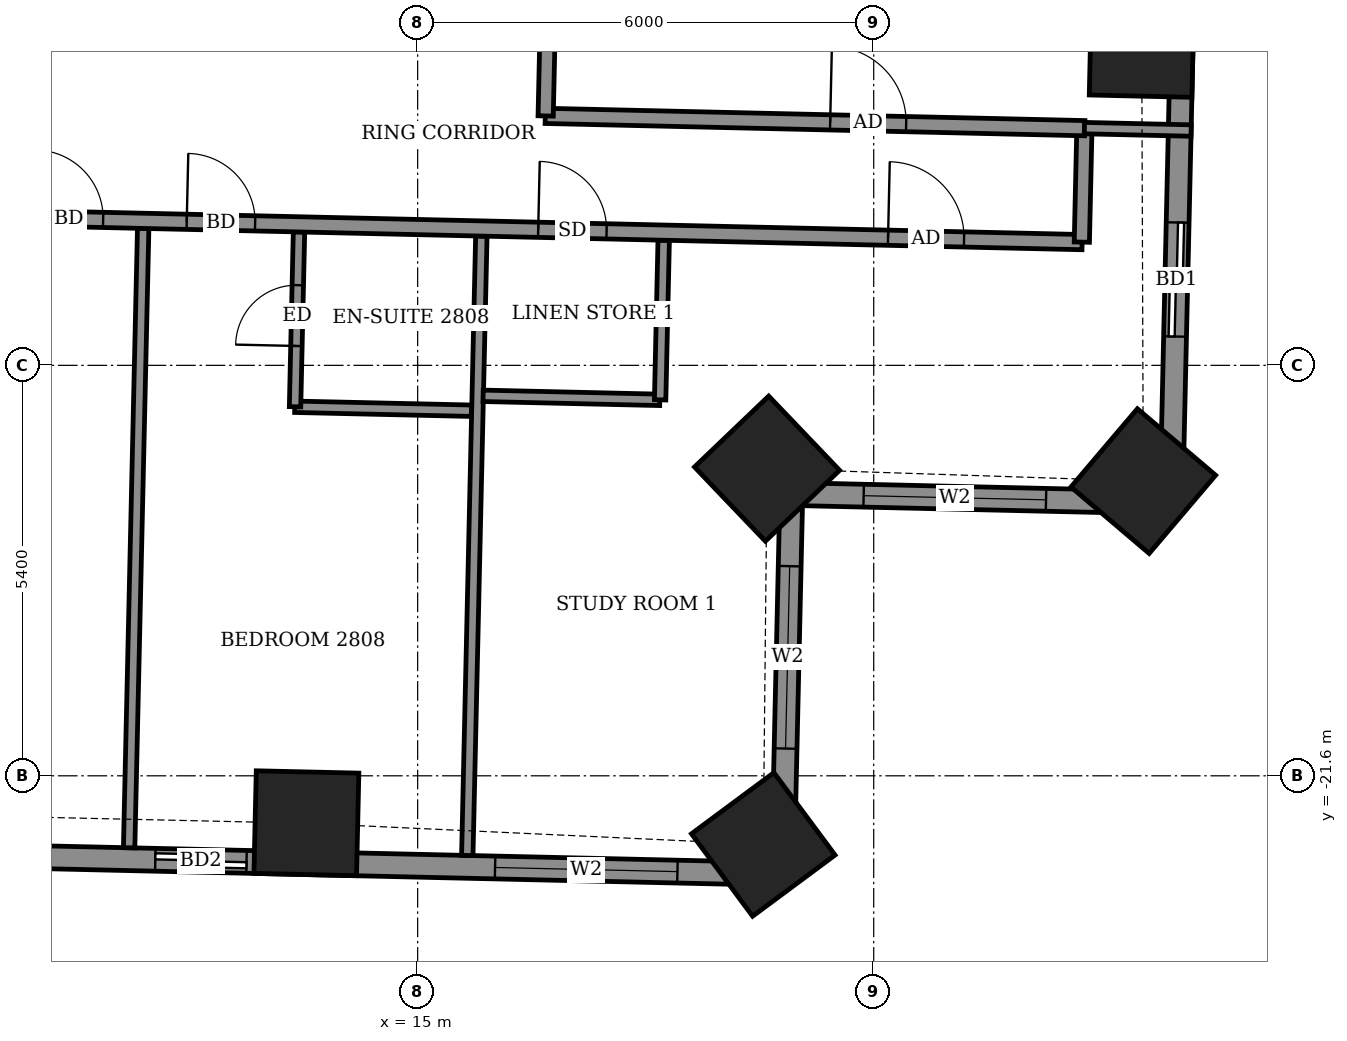
"""IFC4 building model, lengths in metres.
Left out: names, types, materials, properties, quantities, classifications, styles, units other than length and angle.
Written with IfcOpenShell. Run it as: python <this file> out.ifc"""

import sys

from ifc_helpers import new_model, si_unit, direction, frame, frame_2d, origin, origin_2d, place, context, subcontext, project, spatial, rectangle, extrude, element, fill, save


model = new_model("IFC4")
c1 = context("Model", 3, precision=1e-05, world=origin(), true_north=direction((0.0, 1.0)))
c2 = subcontext(c1, "Body", "Model", "MODEL_VIEW")
j1 = project(units=[si_unit("LENGTHUNIT", "METRE"), si_unit("PLANEANGLEUNIT", "RADIAN")], contexts=[c1])
p1 = place(None, origin())
s1 = spatial("IfcSite", under=j1, at=p1, CompositionType="ELEMENT")
p2 = place(p1, origin())
s2 = spatial("IfcBuilding", under=s1, at=p2, CompositionType="ELEMENT")
p3 = place(p2, frame((0.0, 0.0, 112.7)))
s3 = spatial("IfcBuildingStorey", under=s2, at=p3, CompositionType="ELEMENT", Elevation=112.7)
for number, where, z_axis, x_axis in (
    (1, (13.536, -22.224, -0.55), (0.0, 0.0, 1.0), (1.0, -0.023, 0.0)),
    (2, (19.547, -22.503, -0.55), (0.0, 0.0, 1.0), (0.803, 0.596, 0.0)),
    (3, (19.597, -17.559, -0.55), (0.0, 0.0, 1.0), (0.723, 0.691, 0.0)),
    (4, (24.547, -17.723, -0.55), (0.0, 0.0, 1.0), (0.647, 0.762, 0.0)),
    (5, (24.526, -11.984, -0.55), (0.0, 0.0, 1.0), (0.023, 1.0, 0.0)),
):
    element("IfcColumn", number, at=place(p3, frame(where, z_axis=z_axis, x_axis=x_axis)), inside=s3, PredefinedType="COLUMN", context=c2, shape_type="SweptSolid", body=[
        extrude(rectangle(XDim=1.35, YDim=1.35, at=origin_2d()), origin(), (0.0, 0.0, 1.0), 3.6),
    ])
p4 = place(p3, frame((24.915, -18.007, 0.0), z_axis=(0.0, 0.0, 1.0), x_axis=(0.02263706344, 0.999743748847, 0.0)))
e6 = element("IfcWall", 6, at=p4, inside=s3, PredefinedType="SOLIDWALL", context=c2, shape_type="SweptSolid", body=[
    extrude(rectangle(XDim=12.23, YDim=0.3, at=frame_2d((6.115, 0.0))), origin(), (0.0, 0.0, 1.0), 3.05),
])
p5 = place(p4, frame((2.187, 0.0, 0.0)))
e7 = element("IfcOpeningElement", 7, at=p5, cuts=e6, PredefinedType="OPENING", context=c2, shape_type="SweptSolid", body=[
    extrude(rectangle(XDim=1.5, YDim=2.4, at=frame_2d((0.75, 1.2))), frame((0.0, 0.16, 0.0), z_axis=(0.0, -1.0, 0.0), x_axis=(1.0, 0.0, 0.0)), (0.0, 0.0, 1.0), 0.32),
])
p6 = place(p4, frame((7.014, 0.0, 0.9)))
e8 = element("IfcOpeningElement", 8, at=p6, cuts=e6, PredefinedType="OPENING", context=c2, shape_type="SweptSolid", body=[
    extrude(rectangle(XDim=2.4, YDim=1.5, at=frame_2d((1.2, 0.75))), frame((0.0, 0.16, 0.0), z_axis=(0.0, -1.0, 0.0), x_axis=(1.0, 0.0, 0.0)), (0.0, 0.0, 1.0), 0.32),
])
p7 = place(p3, frame((-24.894, -21.878, 0.0), z_axis=(0.0, 0.0, 1.0), x_axis=(0.999742689045, -0.022683820265, 0.0)))
e9 = element("IfcWall", 9, at=p7, inside=s3, PredefinedType="SOLIDWALL", context=c2, shape_type="SweptSolid", body=[
    extrude(rectangle(XDim=44.708, YDim=0.3, at=frame_2d((22.354, 0.0))), origin(), (0.0, 0.0, 1.0), 3.05),
])
p8 = place(p7, frame((1.902, 0.0, 0.0)))
e10 = element("IfcOpeningElement", 10, at=p8, cuts=e9, PredefinedType="OPENING", context=c2, shape_type="SweptSolid", body=[
    extrude(rectangle(XDim=1.5, YDim=2.4, at=frame_2d((0.75, 1.2))), frame((0.0, 0.16, 0.0), z_axis=(0.0, -1.0, 0.0), x_axis=(1.0, 0.0, 0.0)), (0.0, 0.0, 1.0), 0.32),
])
p9 = place(p7, frame((7.178, 0.0, 0.0)))
e11 = element("IfcOpeningElement", 11, at=p9, cuts=e9, PredefinedType="OPENING", context=c2, shape_type="SweptSolid", body=[
    extrude(rectangle(XDim=1.2, YDim=2.4, at=frame_2d((0.6, 1.2))), frame((0.0, 0.16, 0.0), z_axis=(0.0, -1.0, 0.0), x_axis=(1.0, 0.0, 0.0)), (0.0, 0.0, 1.0), 0.32),
])
p10 = place(p7, frame((9.817, 0.0, 0.0)))
e12 = element("IfcOpeningElement", 12, at=p10, cuts=e9, PredefinedType="OPENING", context=c2, shape_type="SweptSolid", body=[
    extrude(rectangle(XDim=1.5, YDim=2.4, at=frame_2d((0.75, 1.2))), frame((0.0, 0.16, 0.0), z_axis=(0.0, -1.0, 0.0), x_axis=(1.0, 0.0, 0.0)), (0.0, 0.0, 1.0), 0.32),
])
p11 = place(p7, frame((14.9, 0.0, 0.0)))
e13 = element("IfcOpeningElement", 13, at=p11, cuts=e9, PredefinedType="OPENING", context=c2, shape_type="SweptSolid", body=[
    extrude(rectangle(XDim=1.5, YDim=2.4, at=frame_2d((0.75, 1.2))), frame((0.0, 0.16, 0.0), z_axis=(0.0, -1.0, 0.0), x_axis=(1.0, 0.0, 0.0)), (0.0, 0.0, 1.0), 0.32),
])
p12 = place(p7, frame((20.207, 0.0, 0.0)))
e14 = element("IfcOpeningElement", 14, at=p12, cuts=e9, PredefinedType="OPENING", context=c2, shape_type="SweptSolid", body=[
    extrude(rectangle(XDim=1.5, YDim=2.4, at=frame_2d((0.75, 1.2))), frame((0.0, 0.16, 0.0), z_axis=(0.0, -1.0, 0.0), x_axis=(1.0, 0.0, 0.0)), (0.0, 0.0, 1.0), 0.32),
])
p13 = place(p7, frame((22.997, 0.0, 0.0)))
e15 = element("IfcOpeningElement", 15, at=p13, cuts=e9, PredefinedType="OPENING", context=c2, shape_type="SweptSolid", body=[
    extrude(rectangle(XDim=1.5, YDim=2.4, at=frame_2d((0.75, 1.2))), frame((0.0, 0.16, 0.0), z_axis=(0.0, -1.0, 0.0), x_axis=(1.0, 0.0, 0.0)), (0.0, 0.0, 1.0), 0.32),
])
p14 = place(p7, frame((28.562, 0.0, 0.0)))
e16 = element("IfcOpeningElement", 16, at=p14, cuts=e9, PredefinedType="OPENING", context=c2, shape_type="SweptSolid", body=[
    extrude(rectangle(XDim=1.5, YDim=2.4, at=frame_2d((0.75, 1.2))), frame((0.0, 0.16, 0.0), z_axis=(0.0, -1.0, 0.0), x_axis=(1.0, 0.0, 0.0)), (0.0, 0.0, 1.0), 0.32),
])
p15 = place(p7, frame((33.512, 0.0, 0.0)))
e17 = element("IfcOpeningElement", 17, at=p15, cuts=e9, PredefinedType="OPENING", context=c2, shape_type="SweptSolid", body=[
    extrude(rectangle(XDim=1.5, YDim=2.4, at=frame_2d((0.75, 1.2))), frame((0.0, 0.16, 0.0), z_axis=(0.0, -1.0, 0.0), x_axis=(1.0, 0.0, 0.0)), (0.0, 0.0, 1.0), 0.32),
])
p16 = place(p7, frame((36.452, 0.0, 0.0)))
e18 = element("IfcOpeningElement", 18, at=p16, cuts=e9, PredefinedType="OPENING", context=c2, shape_type="SweptSolid", body=[
    extrude(rectangle(XDim=1.2, YDim=2.4, at=frame_2d((0.6, 1.2))), frame((0.0, 0.16, 0.0), z_axis=(0.0, -1.0, 0.0), x_axis=(1.0, 0.0, 0.0)), (0.0, 0.0, 1.0), 0.32),
])
p17 = place(p7, frame((40.923, 0.0, 0.9)))
e19 = element("IfcOpeningElement", 19, at=p17, cuts=e9, PredefinedType="OPENING", context=c2, shape_type="SweptSolid", body=[
    extrude(rectangle(XDim=2.4, YDim=1.5, at=frame_2d((1.2, 0.75))), frame((0.0, 0.16, 0.0), z_axis=(0.0, -1.0, 0.0), x_axis=(1.0, 0.0, 0.0)), (0.0, 0.0, 1.0), 0.32),
])
p18 = place(p3, frame((19.803, -22.892, 0.0), z_axis=(0.0, 0.0, 1.0), x_axis=(0.022606059803, 0.999744450377, 0.0)))
e20 = element("IfcWall", 20, at=p18, inside=s3, PredefinedType="SOLIDWALL", context=c2, shape_type="SweptSolid", body=[
    extrude(rectangle(XDim=5.0, YDim=0.3, at=frame_2d((2.5, 0.0))), origin(), (0.0, 0.0, 1.0), 2.55),
])
p19 = place(p18, frame((1.651, 0.0, 0.9)))
e21 = element("IfcOpeningElement", 21, at=p19, cuts=e20, PredefinedType="OPENING", context=c2, shape_type="SweptSolid", body=[
    extrude(rectangle(XDim=2.4, YDim=1.5, at=frame_2d((1.2, 0.75))), frame((0.0, 0.16, 0.0), z_axis=(0.0, -1.0, 0.0), x_axis=(1.0, 0.0, 0.0)), (0.0, 0.0, 1.0), 0.32),
])
p20 = place(p3, frame((19.916, -17.893, 0.0), z_axis=(0.0, 0.0, 1.0), x_axis=(0.999740017489, -0.022801259434, 0.0)))
e22 = element("IfcWall", 22, at=p20, inside=s3, PredefinedType="SOLIDWALL", context=c2, shape_type="SweptSolid", body=[
    extrude(rectangle(XDim=5.0, YDim=0.3, at=frame_2d((2.5, 0.0))), origin(), (0.0, 0.0, 1.0), 2.55),
])
p21 = place(p20, frame((0.952, 0.0, 0.9)))
e23 = element("IfcOpeningElement", 23, at=p21, cuts=e22, PredefinedType="OPENING", context=c2, shape_type="SweptSolid", body=[
    extrude(rectangle(XDim=2.4, YDim=1.5, at=frame_2d((1.2, 0.75))), frame((0.0, 0.16, 0.0), z_axis=(0.0, -1.0, 0.0), x_axis=(1.0, 0.0, 0.0)), (0.0, 0.0, 1.0), 0.32),
])
p22 = place(p3, frame((11.204, -22.547, 0.0), z_axis=(0.0, 0.0, 1.0), x_axis=(0.022675815822, 0.999742870631, 0.0)))
e24 = element("IfcWall", 24, at=p22, inside=s3, PredefinedType="PARTITIONING", context=c2, shape_type="SweptSolid", body=[
    extrude(rectangle(XDim=8.15, YDim=0.15, at=frame_2d((4.075, 0.0))), origin(), (0.0, 0.0, 1.0), 2.55),
])
p23 = place(p3, frame((15.653, -22.648, 0.0), z_axis=(0.0, 0.0, 1.0), x_axis=(0.022676494918, 0.999742855227, 0.0)))
e25 = element("IfcWall", 25, at=p23, inside=s3, PredefinedType="PARTITIONING", context=c2, shape_type="SweptSolid", body=[
    extrude(rectangle(XDim=8.15, YDim=0.15, at=frame_2d((4.075, 0.0))), origin(), (0.0, 0.0, 1.0), 2.55),
])
p24 = place(p3, frame((13.383, -16.745, 0.0), z_axis=(0.0, 0.0, 1.0), x_axis=(0.999749744571, -0.022370700241, 0.0)))
e26 = element("IfcWall", 26, at=p24, inside=s3, PredefinedType="PARTITIONING", context=c2, shape_type="SweptSolid", body=[
    extrude(rectangle(XDim=2.324, YDim=0.15, at=frame_2d((1.162, 0.0))), origin(), (0.0, 0.0, 1.0), 3.05),
])
p25 = place(p3, frame((13.387, -16.745, 0.0), z_axis=(0.0, 0.0, 1.0), x_axis=(0.022603288534, 0.999744513037, 0.0)))
e27 = element("IfcWall", 27, at=p25, inside=s3, PredefinedType="PARTITIONING", context=c2, shape_type="SweptSolid", body=[
    extrude(rectangle(XDim=2.301, YDim=0.15, at=frame_2d((1.15, 0.0))), origin(), (0.0, 0.0, 1.0), 3.05),
])
p26 = place(p25, frame((0.8, 0.0, 0.0)))
e28 = element("IfcOpeningElement", 28, at=p26, cuts=e27, PredefinedType="OPENING", context=c2, shape_type="SweptSolid", body=[
    extrude(rectangle(XDim=0.8, YDim=2.1, at=frame_2d((0.4, 1.05))), frame((0.0, 0.085, 0.0), z_axis=(0.0, -1.0, 0.0), x_axis=(1.0, 0.0, 0.0)), (0.0, 0.0, 1.0), 0.17),
])
p27 = place(p3, frame((15.861, -16.601, 0.0), z_axis=(0.0, 0.0, 1.0), x_axis=(0.999740478815, -0.022781023197, 0.0)))
e29 = element("IfcWall", 29, at=p27, inside=s3, PredefinedType="PARTITIONING", context=c2, shape_type="SweptSolid", body=[
    extrude(rectangle(XDim=2.325, YDim=0.15, at=frame_2d((1.163, 0.0))), origin(), (0.0, 0.0, 1.0), 3.05),
])
p28 = place(p3, frame((18.19, -16.654, 0.0), z_axis=(0.0, 0.0, 1.0), x_axis=(0.022430997437, 0.999748393524, 0.0)))
e30 = element("IfcWall", 30, at=p28, inside=s3, PredefinedType="PARTITIONING", context=c2, shape_type="SweptSolid", body=[
    extrude(rectangle(XDim=2.101, YDim=0.15, at=frame_2d((1.05, 0.0))), origin(), (0.0, 0.0, 1.0), 3.05),
])
p29 = place(p3, frame((-26.978, -13.428, 0.0), z_axis=(0.0, 0.0, 1.0), x_axis=(0.999742553034, -0.02268981385, 0.0)))
e31 = element("IfcWall", 31, at=p29, inside=s3, PredefinedType="PARTITIONING", context=c2, shape_type="SweptSolid", body=[
    extrude(rectangle(XDim=50.733, YDim=0.2, at=frame_2d((25.366, 0.0))), origin(), (0.0, 0.0, 1.0), 3.05),
])
p30 = place(p29, frame((2.293, 0.0, 0.0)))
e32 = element("IfcOpeningElement", 32, at=p30, cuts=e31, PredefinedType="OPENING", context=c2, shape_type="SweptSolid", body=[
    extrude(rectangle(XDim=1.0, YDim=2.1, at=frame_2d((0.5, 1.05))), frame((0.0, 0.11, 0.0), z_axis=(0.0, -1.0, 0.0), x_axis=(1.0, 0.0, 0.0)), (0.0, 0.0, 1.0), 0.22),
])
p31 = place(p29, frame((9.65, 0.0, 0.0)))
e33 = element("IfcOpeningElement", 33, at=p31, cuts=e31, PredefinedType="OPENING", context=c2, shape_type="SweptSolid", body=[
    extrude(rectangle(XDim=0.9, YDim=2.1, at=frame_2d((0.45, 1.05))), frame((0.0, 0.11, 0.0), z_axis=(0.0, -1.0, 0.0), x_axis=(1.0, 0.0, 0.0)), (0.0, 0.0, 1.0), 0.22),
])
p32 = place(p29, frame((11.75, 0.0, 0.0)))
e34 = element("IfcOpeningElement", 34, at=p32, cuts=e31, PredefinedType="OPENING", context=c2, shape_type="SweptSolid", body=[
    extrude(rectangle(XDim=0.9, YDim=2.1, at=frame_2d((0.45, 1.05))), frame((0.0, 0.11, 0.0), z_axis=(0.0, -1.0, 0.0), x_axis=(1.0, 0.0, 0.0)), (0.0, 0.0, 1.0), 0.22),
])
p33 = place(p29, frame((18.675, 0.0, 0.0)))
e35 = element("IfcOpeningElement", 35, at=p33, cuts=e31, PredefinedType="OPENING", context=c2, shape_type="SweptSolid", body=[
    extrude(rectangle(XDim=0.9, YDim=2.1, at=frame_2d((0.45, 1.05))), frame((0.0, 0.11, 0.0), z_axis=(0.0, -1.0, 0.0), x_axis=(1.0, 0.0, 0.0)), (0.0, 0.0, 1.0), 0.22),
])
p34 = place(p29, frame((20.75, 0.0, 0.0)))
e36 = element("IfcOpeningElement", 36, at=p34, cuts=e31, PredefinedType="OPENING", context=c2, shape_type="SweptSolid", body=[
    extrude(rectangle(XDim=0.9, YDim=2.1, at=frame_2d((0.45, 1.05))), frame((0.0, 0.11, 0.0), z_axis=(0.0, -1.0, 0.0), x_axis=(1.0, 0.0, 0.0)), (0.0, 0.0, 1.0), 0.22),
])
p35 = place(p29, frame((27.725, 0.0, 0.0)))
e37 = element("IfcOpeningElement", 37, at=p35, cuts=e31, PredefinedType="OPENING", context=c2, shape_type="SweptSolid", body=[
    extrude(rectangle(XDim=0.9, YDim=2.1, at=frame_2d((0.45, 1.05))), frame((0.0, 0.11, 0.0), z_axis=(0.0, -1.0, 0.0), x_axis=(1.0, 0.0, 0.0)), (0.0, 0.0, 1.0), 0.22),
])
p36 = place(p29, frame((30.025, 0.0, 0.0)))
e38 = element("IfcOpeningElement", 38, at=p36, cuts=e31, PredefinedType="OPENING", context=c2, shape_type="SweptSolid", body=[
    extrude(rectangle(XDim=0.9, YDim=2.1, at=frame_2d((0.45, 1.05))), frame((0.0, 0.11, 0.0), z_axis=(0.0, -1.0, 0.0), x_axis=(1.0, 0.0, 0.0)), (0.0, 0.0, 1.0), 0.22),
])
p37 = place(p29, frame((36.95, 0.0, 0.0)))
e39 = element("IfcOpeningElement", 39, at=p37, cuts=e31, PredefinedType="OPENING", context=c2, shape_type="SweptSolid", body=[
    extrude(rectangle(XDim=0.9, YDim=2.1, at=frame_2d((0.45, 1.05))), frame((0.0, 0.11, 0.0), z_axis=(0.0, -1.0, 0.0), x_axis=(1.0, 0.0, 0.0)), (0.0, 0.0, 1.0), 0.22),
])
p38 = place(p29, frame((38.95, 0.0, 0.0)))
e40 = element("IfcOpeningElement", 40, at=p38, cuts=e31, PredefinedType="OPENING", context=c2, shape_type="SweptSolid", body=[
    extrude(rectangle(XDim=0.9, YDim=2.1, at=frame_2d((0.45, 1.05))), frame((0.0, 0.11, 0.0), z_axis=(0.0, -1.0, 0.0), x_axis=(1.0, 0.0, 0.0)), (0.0, 0.0, 1.0), 0.22),
])
p39 = place(p29, frame((48.179, 0.0, 0.0)))
e41 = element("IfcOpeningElement", 41, at=p39, cuts=e31, PredefinedType="OPENING", context=c2, shape_type="SweptSolid", body=[
    extrude(rectangle(XDim=1.0, YDim=2.1, at=frame_2d((0.5, 1.05))), frame((0.0, 0.11, 0.0), z_axis=(0.0, -1.0, 0.0), x_axis=(1.0, 0.0, 0.0)), (0.0, 0.0, 1.0), 0.22),
])
p40 = place(p29, frame((43.575, 0.0, 0.0)))
e42 = element("IfcOpeningElement", 42, at=p40, cuts=e31, PredefinedType="OPENING", context=c2, shape_type="SweptSolid", body=[
    extrude(rectangle(XDim=0.9, YDim=2.1, at=frame_2d((0.45, 1.05))), frame((0.0, 0.11, 0.0), z_axis=(0.0, -1.0, 0.0), x_axis=(1.0, 0.0, 0.0)), (0.0, 0.0, 1.0), 0.22),
])
p41 = place(p3, frame((23.738, -14.579, 0.0), z_axis=(0.0, 0.0, 1.0), x_axis=(0.022617910375, 0.999744182344, 0.0)))
e43 = element("IfcWall", 43, at=p41, inside=s3, PredefinedType="PARTITIONING", context=c2, shape_type="SweptSolid", body=[
    extrude(rectangle(XDim=1.5, YDim=0.2, at=frame_2d((0.75, 0.0))), origin(), (0.0, 0.0, 1.0), 3.05),
])
p42 = place(p3, frame((16.679, -12.918, 0.0), z_axis=(0.0, 0.0, 1.0), x_axis=(0.999739218926, -0.02283624622, 0.0)))
e44 = element("IfcWall", 44, at=p42, inside=s3, PredefinedType="PARTITIONING", context=c2, shape_type="SweptSolid", body=[
    extrude(rectangle(XDim=7.099, YDim=0.2, at=frame_2d((3.549, 0.0))), origin(), (0.0, 0.0, 1.0), 3.05),
])
p43 = place(p42, frame((3.749, 0.0, 0.0)))
e45 = element("IfcOpeningElement", 45, at=p43, cuts=e44, PredefinedType="OPENING", context=c2, shape_type="SweptSolid", body=[
    extrude(rectangle(XDim=1.0, YDim=2.1, at=frame_2d((0.5, 1.05))), frame((0.0, 0.11, 0.0), z_axis=(0.0, -1.0, 0.0), x_axis=(1.0, 0.0, 0.0)), (0.0, 0.0, 1.0), 0.22),
])
p44 = place(p3, frame((16.684, -12.919, 0.0), z_axis=(0.0, 0.0, 1.0), x_axis=(0.022667483124, 0.999743059595, 0.0)))
e46 = element("IfcWall", 46, at=p44, inside=s3, PredefinedType="PARTITIONING", context=c2, shape_type="SweptSolid", body=[
    extrude(rectangle(XDim=5.245, YDim=0.2, at=frame_2d((2.623, 0.0))), origin(), (0.0, 0.0, 1.0), 3.05),
])
p45 = place(p3, frame((23.772, -13.079, 0.0), z_axis=(0.0, 0.0, 1.0), x_axis=(0.999740667531, -0.022772739949, 0.0)))
e47 = element("IfcWall", 47, at=p45, inside=s3, PredefinedType="PARTITIONING", context=c2, shape_type="SweptSolid", body=[
    extrude(rectangle(XDim=1.404, YDim=0.15, at=frame_2d((0.702, 0.0))), origin(), (0.0, 0.0, 1.0), 2.55),
])
p46 = place(p5, origin())
e48 = element("IfcDoor", 48, at=p46, inside=s3, OperationType="SLIDING_TO_LEFT", PredefinedType="DOOR", context=c2, shape_type="SweptSolid", body=[
    extrude(rectangle(XDim=1.5, YDim=2.4, at=frame_2d((0.75, 1.2))), frame((0.0, 0.025, 0.0), z_axis=(0.0, -1.0, 0.0), x_axis=(1.0, 0.0, 0.0)), (0.0, 0.0, 1.0), 0.05),
])
fill(e7, e48)
p47 = place(p16, origin())
e49 = element("IfcDoor", 49, at=p47, inside=s3, OperationType="SLIDING_TO_LEFT", PredefinedType="DOOR", context=c2, shape_type="SweptSolid", body=[
    extrude(rectangle(XDim=1.2, YDim=2.4, at=frame_2d((0.6, 1.2))), frame((0.0, 0.025, 0.0), z_axis=(0.0, -1.0, 0.0), x_axis=(1.0, 0.0, 0.0)), (0.0, 0.0, 1.0), 0.05),
])
fill(e18, e49)
p48 = place(p17, origin())
e50 = element("IfcWindow", 50, at=p48, inside=s3, PartitioningType="DOUBLE_PANEL_VERTICAL", PredefinedType="WINDOW", context=c2, shape_type="SweptSolid", body=[
    extrude(rectangle(XDim=2.4, YDim=1.5, at=frame_2d((1.2, 0.75))), frame((0.0, 0.03, 0.0), z_axis=(0.0, -1.0, 0.0), x_axis=(1.0, 0.0, 0.0)), (0.0, 0.0, 1.0), 0.06),
])
fill(e19, e50)
p49 = place(p19, origin())
e51 = element("IfcWindow", 51, at=p49, inside=s3, PartitioningType="DOUBLE_PANEL_VERTICAL", PredefinedType="WINDOW", context=c2, shape_type="SweptSolid", body=[
    extrude(rectangle(XDim=2.4, YDim=1.5, at=frame_2d((1.2, 0.75))), frame((0.0, 0.03, 0.0), z_axis=(0.0, -1.0, 0.0), x_axis=(1.0, 0.0, 0.0)), (0.0, 0.0, 1.0), 0.06),
])
fill(e21, e51)
p50 = place(p21, origin())
e52 = element("IfcWindow", 52, at=p50, inside=s3, PartitioningType="DOUBLE_PANEL_VERTICAL", PredefinedType="WINDOW", context=c2, shape_type="SweptSolid", body=[
    extrude(rectangle(XDim=2.4, YDim=1.5, at=frame_2d((1.2, 0.75))), frame((0.0, 0.03, 0.0), z_axis=(0.0, -1.0, 0.0), x_axis=(1.0, 0.0, 0.0)), (0.0, 0.0, 1.0), 0.06),
])
fill(e23, e52)
p51 = place(p37, origin())
e53 = element("IfcDoor", 53, at=p51, inside=s3, OperationType="SINGLE_SWING_LEFT", PredefinedType="DOOR", context=c2, shape_type="SweptSolid", body=[
    extrude(rectangle(XDim=0.9, YDim=2.1, at=frame_2d((0.45, 1.05))), frame((0.0, 0.025, 0.0), z_axis=(0.0, -1.0, 0.0), x_axis=(1.0, 0.0, 0.0)), (0.0, 0.0, 1.0), 0.05),
])
fill(e39, e53)
p52 = place(p38, origin())
e54 = element("IfcDoor", 54, at=p52, inside=s3, OperationType="SINGLE_SWING_RIGHT", PredefinedType="DOOR", context=c2, shape_type="SweptSolid", body=[
    extrude(rectangle(XDim=0.9, YDim=2.1, at=frame_2d((0.45, 1.05))), frame((0.0, 0.025, 0.0), z_axis=(0.0, -1.0, 0.0), x_axis=(1.0, 0.0, 0.0)), (0.0, 0.0, 1.0), 0.05),
])
fill(e40, e54)
p53 = place(p26, origin())
e55 = element("IfcDoor", 55, at=p53, inside=s3, OperationType="SINGLE_SWING_RIGHT", PredefinedType="DOOR", context=c2, shape_type="SweptSolid", body=[
    extrude(rectangle(XDim=0.8, YDim=2.1, at=frame_2d((0.4, 1.05))), frame((0.0, 0.025, 0.0), z_axis=(0.0, -1.0, 0.0), x_axis=(1.0, 0.0, 0.0)), (0.0, 0.0, 1.0), 0.05),
])
fill(e28, e55)
p54 = place(p39, origin())
e56 = element("IfcDoor", 56, at=p54, inside=s3, OperationType="SINGLE_SWING_RIGHT", PredefinedType="DOOR", context=c2, shape_type="SweptSolid", body=[
    extrude(rectangle(XDim=1.0, YDim=2.1, at=frame_2d((0.5, 1.05))), frame((0.0, 0.025, 0.0), z_axis=(0.0, -1.0, 0.0), x_axis=(1.0, 0.0, 0.0)), (0.0, 0.0, 1.0), 0.05),
])
fill(e41, e56)
p55 = place(p40, origin())
e57 = element("IfcDoor", 57, at=p55, inside=s3, OperationType="SINGLE_SWING_LEFT", PredefinedType="DOOR", context=c2, shape_type="SweptSolid", body=[
    extrude(rectangle(XDim=0.9, YDim=2.1, at=frame_2d((0.45, 1.05))), frame((0.0, 0.025, 0.0), z_axis=(0.0, -1.0, 0.0), x_axis=(1.0, 0.0, 0.0)), (0.0, 0.0, 1.0), 0.05),
])
fill(e42, e57)
p56 = place(p43, origin())
e58 = element("IfcDoor", 58, at=p56, inside=s3, OperationType="SINGLE_SWING_LEFT", PredefinedType="DOOR", context=c2, shape_type="SweptSolid", body=[
    extrude(rectangle(XDim=1.0, YDim=2.1, at=frame_2d((0.5, 1.05))), frame((0.0, 0.025, 0.0), z_axis=(0.0, -1.0, 0.0), x_axis=(1.0, 0.0, 0.0)), (0.0, 0.0, 1.0), 0.05),
])
fill(e45, e58)
save(model, sys.argv[1])
